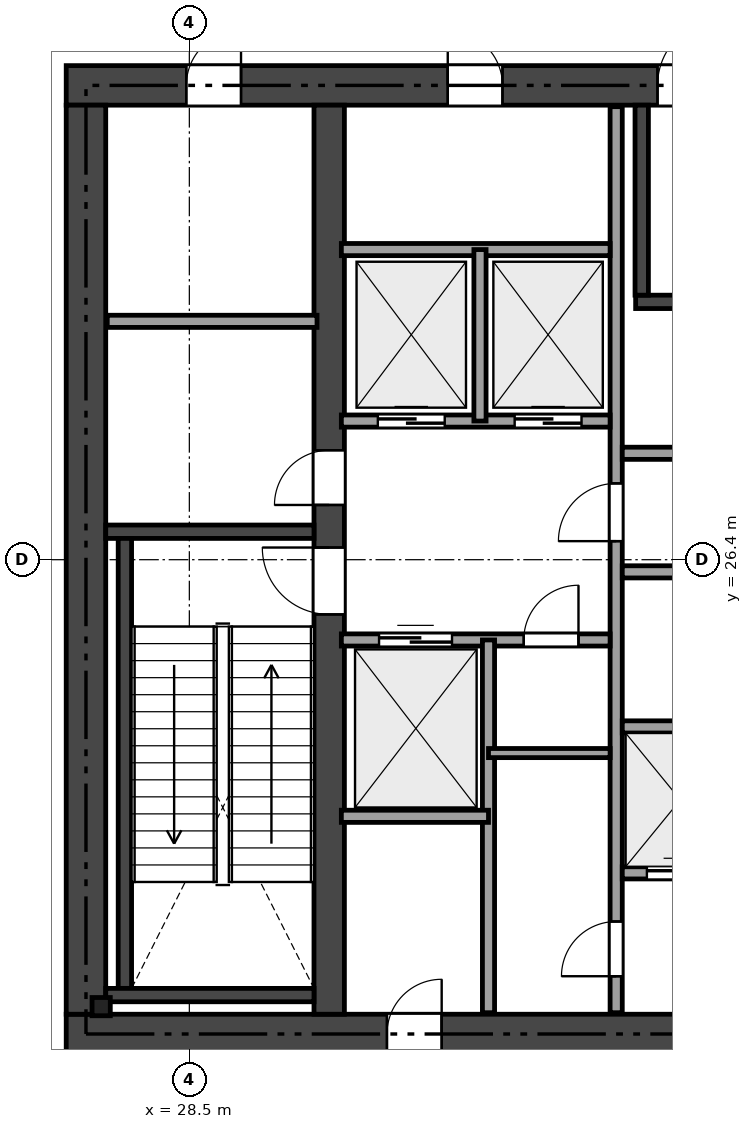
"""IFC4 building model, lengths in metres.
Left out: names, types, materials, properties, quantities, classifications, styles, units other than length and angle.
Written with IfcOpenShell. Run it as: python <this file> out.ifc"""

import sys

from ifc_helpers import new_model, si_unit, direction, frame, frame_2d, origin, origin_2d, place, context, subcontext, project, spatial, rectangle, i_section, extrude, element, fill, save


model = new_model("IFC4")
c1 = context("Model", 3, precision=1e-05, world=origin(), true_north=direction((0.0, 1.0)))
c2 = subcontext(c1, "Body", "Model", "MODEL_VIEW")
j1 = project(units=[si_unit("LENGTHUNIT", "METRE"), si_unit("PLANEANGLEUNIT", "RADIAN")], contexts=[c1])
p1 = place(None, origin())
s1 = spatial("IfcSite", under=j1, at=p1, CompositionType="ELEMENT")
p2 = place(p1, origin())
s2 = spatial("IfcBuilding", under=s1, at=p2, CompositionType="ELEMENT")
p3 = place(p2, frame((0.0, 0.0, 21.6)))
s3 = spatial("IfcBuildingStorey", under=s2, at=p3, CompositionType="ELEMENT", Elevation=21.6)
p4 = place(p3, frame((26.475, 18.6, 0.0), z_axis=(0.0, 0.0, 1.0), x_axis=(1.0, 0.0, 0.0)))
e1 = element("IfcWall", 1, at=p4, inside=s3, PredefinedType="SHEAR", context=c2, shape_type="SweptSolid", body=[
    extrude(rectangle(XDim=21.45, YDim=0.65, at=frame_2d((10.725, 0.0))), origin(), (0.0, 0.0, 1.0), 4.98),
])
p5 = place(p4, frame((12.45, 0.0, 0.0)))
e2 = element("IfcOpeningElement", 2, at=p5, cuts=e1, PredefinedType="OPENING", context=c2, shape_type="SweptSolid", body=[
    extrude(rectangle(XDim=1.15, YDim=2.15, at=frame_2d((0.575, 1.075))), frame((0.0, 0.335, 0.0), z_axis=(0.0, -1.0, 0.0), x_axis=(1.0, 0.0, 0.0)), (0.0, 0.0, 1.0), 0.67),
])
p6 = place(p4, frame((5.275, 0.0, 0.0)))
e3 = element("IfcOpeningElement", 3, at=p6, cuts=e1, PredefinedType="OPENING", context=c2, shape_type="SweptSolid", body=[
    extrude(rectangle(XDim=0.9, YDim=2.1, at=frame_2d((0.45, 1.05))), frame((0.0, 0.335, 0.0), z_axis=(0.0, -1.0, 0.0), x_axis=(1.0, 0.0, 0.0)), (0.0, 0.0, 1.0), 0.67),
])
p7 = place(p3, frame((26.475, 34.2, 0.0), z_axis=(0.0, 0.0, 1.0), x_axis=(1.0, 0.0, 0.0)))
e4 = element("IfcWall", 4, at=p7, inside=s3, PredefinedType="SHEAR", context=c2, shape_type="SweptSolid", body=[
    extrude(rectangle(XDim=21.45, YDim=0.65, at=frame_2d((10.725, 0.0))), origin(), (0.0, 0.0, 1.0), 4.98),
])
p8 = place(p7, frame((9.725, 0.0, 0.0)))
e5 = element("IfcOpeningElement", 5, at=p8, cuts=e4, PredefinedType="OPENING", context=c2, shape_type="SweptSolid", body=[
    extrude(rectangle(XDim=1.1, YDim=2.15, at=frame_2d((0.55, 1.075))), frame((0.0, 0.335, 0.0), z_axis=(0.0, -1.0, 0.0), x_axis=(1.0, 0.0, 0.0)), (0.0, 0.0, 1.0), 0.67),
])
p9 = place(p7, frame((1.975, 0.0, 0.0)))
e6 = element("IfcOpeningElement", 6, at=p9, cuts=e4, PredefinedType="OPENING", context=c2, shape_type="SweptSolid", body=[
    extrude(rectangle(XDim=0.9, YDim=2.1, at=frame_2d((0.45, 1.05))), frame((0.0, 0.335, 0.0), z_axis=(0.0, -1.0, 0.0), x_axis=(1.0, 0.0, 0.0)), (0.0, 0.0, 1.0), 0.67),
])
p10 = place(p7, frame((6.275, 0.0, 0.0)))
e7 = element("IfcOpeningElement", 7, at=p10, cuts=e4, PredefinedType="OPENING", context=c2, shape_type="SweptSolid", body=[
    extrude(rectangle(XDim=0.9, YDim=2.1, at=frame_2d((0.45, 1.05))), frame((0.0, 0.335, 0.0), z_axis=(0.0, -1.0, 0.0), x_axis=(1.0, 0.0, 0.0)), (0.0, 0.0, 1.0), 0.67),
])
p11 = place(p3, frame((26.8, 18.925, 0.0), z_axis=(0.0, 0.0, 1.0), x_axis=(0.0, 1.0, 0.0)))
e8 = element("IfcWall", 8, at=p11, inside=s3, PredefinedType="SHEAR", context=c2, shape_type="SweptSolid", body=[
    extrude(rectangle(XDim=14.95, YDim=0.65, at=frame_2d((7.475, 0.0))), origin(), (0.0, 0.0, 1.0), 4.98),
])
p12 = place(p3, frame((30.8, 18.925, 0.0), z_axis=(0.0, 0.0, 1.0), x_axis=(0.0, 1.0, 0.0)))
e9 = element("IfcWall", 9, at=p12, inside=s3, PredefinedType="SHEAR", context=c2, shape_type="SweptSolid", body=[
    extrude(rectangle(XDim=14.95, YDim=0.5, at=frame_2d((7.475, 0.0))), origin(), (0.0, 0.0, 1.0), 4.98),
])
p13 = place(p12, frame((6.575, 0.0, 0.0)))
e10 = element("IfcOpeningElement", 10, at=p13, cuts=e9, PredefinedType="OPENING", context=c2, shape_type="SweptSolid", body=[
    extrude(rectangle(XDim=1.1, YDim=2.15, at=frame_2d((0.55, 1.075))), frame((0.0, 0.26, 0.0), z_axis=(0.0, -1.0, 0.0), x_axis=(1.0, 0.0, 0.0)), (0.0, 0.0, 1.0), 0.52),
])
p14 = place(p12, frame((8.375, 0.0, 0.0)))
e11 = element("IfcOpeningElement", 11, at=p14, cuts=e9, PredefinedType="OPENING", context=c2, shape_type="SweptSolid", body=[
    extrude(rectangle(XDim=0.9, YDim=2.1, at=frame_2d((0.45, 1.05))), frame((0.0, 0.26, 0.0), z_axis=(0.0, -1.0, 0.0), x_axis=(1.0, 0.0, 0.0)), (0.0, 0.0, 1.0), 0.52),
])
p15 = place(p3, frame((27.125, 26.86, 0.0), z_axis=(0.0, 0.0, 1.0), x_axis=(1.0, 0.0, 0.0)))
e12 = element("IfcWall", 12, at=p15, inside=s3, PredefinedType="SHEAR", context=c2, shape_type="SweptSolid", body=[
    extrude(rectangle(XDim=3.425, YDim=0.22, at=frame_2d((1.712, 0.0))), origin(), (0.0, 0.0, 1.0), 4.98),
])
p16 = place(p3, frame((27.44, 19.35, 0.0), z_axis=(0.0, 0.0, 1.0), x_axis=(0.0, 1.0, 0.0)))
e13 = element("IfcWall", 13, at=p16, inside=s3, PredefinedType="SHEAR", context=c2, shape_type="SweptSolid", body=[
    extrude(rectangle(XDim=7.4, YDim=0.22, at=frame_2d((3.7, 0.0))), origin(), (0.0, 0.0, 1.0), 4.98),
])
p17 = place(p3, frame((27.125, 19.24, 0.0), z_axis=(0.0, 0.0, 1.0), x_axis=(1.0, 0.0, 0.0)))
e14 = element("IfcWall", 14, at=p17, inside=s3, PredefinedType="SHEAR", context=c2, shape_type="SweptSolid", body=[
    extrude(rectangle(XDim=3.425, YDim=0.22, at=frame_2d((1.712, 0.0))), origin(), (0.0, 0.0, 1.0), 4.98),
])
p18 = place(p3, frame((35.84, 30.64, 0.0), z_axis=(0.0, 0.0, 1.0), x_axis=(1.0, 0.0, 0.0)))
e15 = element("IfcWall", 15, at=p18, inside=s3, PredefinedType="SHEAR", context=c2, shape_type="SweptSolid", body=[
    extrude(rectangle(XDim=7.61, YDim=0.22, at=frame_2d((3.805, 0.0))), origin(), (0.0, 0.0, 1.0), 4.98),
])
p19 = place(p3, frame((35.94, 30.75, 0.0), z_axis=(0.0, 0.0, 1.0), x_axis=(0.0, 1.0, 0.0)))
e16 = element("IfcWall", 16, at=p19, inside=s3, PredefinedType="SHEAR", context=c2, shape_type="SweptSolid", body=[
    extrude(rectangle(XDim=3.125, YDim=0.22, at=frame_2d((1.562, 0.0))), origin(), (0.0, 0.0, 1.0), 4.98),
])
p20 = place(p3, frame((27.05, 19.05, 0.0), z_axis=(0.0, 0.0, 1.0), x_axis=(1.0, 0.0, 0.0)))
e17 = element("IfcColumn", 17, at=p20, inside=s3, PredefinedType="PILASTER", context=c2, shape_type="SweptSolid", body=[
    extrude(i_section(OverallWidth=0.3, OverallDepth=0.3, WebThickness=0.011, FlangeThickness=0.019, at=origin_2d()), origin(), (0.0, 0.0, 1.0), 4.98),
])
p21 = place(p3, frame((27.15, 30.32, 0.0), z_axis=(0.0, 0.0, 1.0), x_axis=(1.0, 0.0, 0.0)))
e18 = element("IfcWall", 18, at=p21, inside=s3, PredefinedType="SOLIDWALL", context=c2, shape_type="SweptSolid", body=[
    extrude(rectangle(XDim=3.45, YDim=0.2, at=frame_2d((1.725, 0.0))), origin(), (0.0, 0.0, 1.0), 4.98),
])
p22 = place(p3, frame((35.52, 18.95, 0.0), z_axis=(0.0, 0.0, 1.0), x_axis=(0.0, 1.0, 0.0)))
e19 = element("IfcWall", 19, at=p22, inside=s3, PredefinedType="SOLIDWALL", context=c2, shape_type="SweptSolid", body=[
    extrude(rectangle(XDim=14.9, YDim=0.2, at=frame_2d((7.45, 0.0))), origin(), (0.0, 0.0, 1.0), 4.501),
])
p23 = place(p22, frame((7.755, 0.0, 0.0)))
e20 = element("IfcOpeningElement", 20, at=p23, cuts=e19, PredefinedType="OPENING", context=c2, shape_type="SweptSolid", body=[
    extrude(rectangle(XDim=0.95, YDim=2.15, at=frame_2d((0.475, 1.075))), frame((0.0, 0.11, 0.0), z_axis=(0.0, -1.0, 0.0), x_axis=(1.0, 0.0, 0.0)), (0.0, 0.0, 1.0), 0.22),
])
p24 = place(p22, frame((0.6, 0.0, 0.0)))
e21 = element("IfcOpeningElement", 21, at=p24, cuts=e19, PredefinedType="OPENING", context=c2, shape_type="SweptSolid", body=[
    extrude(rectangle(XDim=0.9, YDim=2.1, at=frame_2d((0.45, 1.05))), frame((0.0, 0.11, 0.0), z_axis=(0.0, -1.0, 0.0), x_axis=(1.0, 0.0, 0.0)), (0.0, 0.0, 1.0), 0.22),
])
p25 = place(p3, frame((31.0, 28.68, 0.0), z_axis=(0.0, 0.0, 1.0), x_axis=(1.0, 0.0, 0.0)))
e22 = element("IfcWall", 22, at=p25, inside=s3, PredefinedType="SOLIDWALL", context=c2, shape_type="SweptSolid", body=[
    extrude(rectangle(XDim=4.42, YDim=0.2, at=frame_2d((2.21, 0.0))), origin(), (0.0, 0.0, 1.0), 4.98),
])
p26 = place(p25, frame((0.6, 0.0, 0.0)))
e23 = element("IfcOpeningElement", 23, at=p26, cuts=e22, PredefinedType="OPENING", context=c2, shape_type="SweptSolid", body=[
    extrude(rectangle(XDim=1.1, YDim=2.15, at=frame_2d((0.55, 1.075))), frame((0.0, 0.11, 0.0), z_axis=(0.0, -1.0, 0.0), x_axis=(1.0, 0.0, 0.0)), (0.0, 0.0, 1.0), 0.22),
])
p27 = place(p25, frame((2.85, 0.0, 0.0)))
e24 = element("IfcOpeningElement", 24, at=p27, cuts=e22, PredefinedType="OPENING", context=c2, shape_type="SweptSolid", body=[
    extrude(rectangle(XDim=1.1, YDim=2.15, at=frame_2d((0.55, 1.075))), frame((0.0, 0.11, 0.0), z_axis=(0.0, -1.0, 0.0), x_axis=(1.0, 0.0, 0.0)), (0.0, 0.0, 1.0), 0.22),
])
p28 = place(p3, frame((31.0, 31.5, 0.0), z_axis=(0.0, 0.0, 1.0), x_axis=(1.0, 0.0, 0.0)))
e25 = element("IfcWall", 25, at=p28, inside=s3, PredefinedType="SOLIDWALL", context=c2, shape_type="SweptSolid", body=[
    extrude(rectangle(XDim=4.42, YDim=0.2, at=frame_2d((2.21, 0.0))), origin(), (0.0, 0.0, 1.0), 4.98),
])
p29 = place(p3, frame((33.28, 28.68, 0.0), z_axis=(0.0, 0.0, 1.0), x_axis=(0.0, 1.0, 0.0)))
e26 = element("IfcWall", 26, at=p29, inside=s3, PredefinedType="SOLIDWALL", context=c2, shape_type="SweptSolid", body=[
    extrude(rectangle(XDim=2.82, YDim=0.2, at=frame_2d((1.41, 0.0))), origin(), (0.0, 0.0, 1.0), 4.98),
])
p30 = place(p3, frame((31.0, 25.08, 0.0), z_axis=(0.0, 0.0, 1.0), x_axis=(1.0, 0.0, 0.0)))
e27 = element("IfcWall", 27, at=p30, inside=s3, PredefinedType="SOLIDWALL", context=c2, shape_type="SweptSolid", body=[
    extrude(rectangle(XDim=4.42, YDim=0.2, at=frame_2d((2.21, 0.0))), origin(), (0.0, 0.0, 1.0), 4.98),
])
p31 = place(p30, frame((3.0, 0.0, 0.0)))
e28 = element("IfcOpeningElement", 28, at=p31, cuts=e27, PredefinedType="OPENING", context=c2, shape_type="SweptSolid", body=[
    extrude(rectangle(XDim=0.9, YDim=2.1, at=frame_2d((0.45, 1.05))), frame((0.0, 0.11, 0.0), z_axis=(0.0, -1.0, 0.0), x_axis=(1.0, 0.0, 0.0)), (0.0, 0.0, 1.0), 0.22),
])
p32 = place(p30, frame((0.62, 0.0, 0.0)))
e29 = element("IfcOpeningElement", 29, at=p32, cuts=e27, PredefinedType="OPENING", context=c2, shape_type="SweptSolid", body=[
    extrude(rectangle(XDim=1.2, YDim=2.15, at=frame_2d((0.6, 1.075))), frame((0.0, 0.11, 0.0), z_axis=(0.0, -1.0, 0.0), x_axis=(1.0, 0.0, 0.0)), (0.0, 0.0, 1.0), 0.22),
])
p33 = place(p3, frame((33.42, 18.95, 0.0), z_axis=(0.0, 0.0, 1.0), x_axis=(0.0, 1.0, 0.0)))
e30 = element("IfcWall", 30, at=p33, inside=s3, PredefinedType="SOLIDWALL", context=c2, shape_type="SweptSolid", body=[
    extrude(rectangle(XDim=6.13, YDim=0.2, at=frame_2d((3.065, 0.0))), origin(), (0.0, 0.0, 1.0), 4.501),
])
p34 = place(p3, frame((31.0, 22.18, 0.0), z_axis=(0.0, 0.0, 1.0), x_axis=(1.0, 0.0, 0.0)))
e31 = element("IfcWall", 31, at=p34, inside=s3, PredefinedType="SOLIDWALL", context=c2, shape_type="SweptSolid", body=[
    extrude(rectangle(XDim=2.42, YDim=0.2, at=frame_2d((1.21, 0.0))), origin(), (0.0, 0.0, 1.0), 4.98),
])
p35 = place(p3, frame((33.42, 23.22, 0.0), z_axis=(0.0, 0.0, 1.0), x_axis=(1.0, 0.0, 0.0)))
e32 = element("IfcWall", 32, at=p35, inside=s3, PredefinedType="PARTITIONING", context=c2, shape_type="SweptSolid", body=[
    extrude(rectangle(XDim=2.0, YDim=0.15, at=frame_2d((1.0, 0.0))), origin(), (0.0, 0.0, 1.0), 4.98),
])
for number, where, z_axis, x_axis in (
    (33, (35.62, 28.15, 0.0), (0.0, 0.0, 1.0), (1.0, 0.0, 0.0)),
    (34, (35.62, 26.2, 0.0), (0.0, 0.0, 1.0), (1.0, 0.0, 0.0)),
):
    element("IfcWall", number, at=place(p3, frame(where, z_axis=z_axis, x_axis=x_axis)), inside=s3, PredefinedType="SOLIDWALL", context=c2, shape_type="SweptSolid", body=[
        extrude(rectangle(XDim=7.88, YDim=0.2, at=frame_2d((3.94, 0.0))), origin(), (0.0, 0.0, 1.0), 4.98),
    ])
p36 = place(p3, frame((35.62, 23.65, 0.0), z_axis=(0.0, 0.0, 1.0), x_axis=(1.0, 0.0, 0.0)))
e35 = element("IfcWall", 35, at=p36, inside=s3, PredefinedType="SOLIDWALL", context=c2, shape_type="SweptSolid", body=[
    extrude(rectangle(XDim=7.88, YDim=0.2, at=frame_2d((3.94, 0.0))), origin(), (0.0, 0.0, 1.0), 4.501),
])
p37 = place(p3, frame((35.62, 21.25, 0.0), z_axis=(0.0, 0.0, 1.0), x_axis=(1.0, 0.0, 0.0)))
e36 = element("IfcWall", 36, at=p37, inside=s3, PredefinedType="SOLIDWALL", context=c2, shape_type="SweptSolid", body=[
    extrude(rectangle(XDim=7.88, YDim=0.2, at=frame_2d((3.94, 0.0))), origin(), (0.0, 0.0, 1.0), 4.98),
])
p38 = place(p37, frame((0.405, 0.0, 0.0)))
e37 = element("IfcOpeningElement", 37, at=p38, cuts=e36, PredefinedType="OPENING", context=c2, shape_type="SweptSolid", body=[
    extrude(rectangle(XDim=1.1, YDim=2.15, at=frame_2d((0.55, 1.075))), frame((0.0, 0.11, 0.0), z_axis=(0.0, -1.0, 0.0), x_axis=(1.0, 0.0, 0.0)), (0.0, 0.0, 1.0), 0.22),
])
p39 = place(p37, frame((2.355, 0.0, 0.0)))
e38 = element("IfcOpeningElement", 38, at=p39, cuts=e36, PredefinedType="OPENING", context=c2, shape_type="SweptSolid", body=[
    extrude(rectangle(XDim=1.1, YDim=2.15, at=frame_2d((0.55, 1.075))), frame((0.0, 0.11, 0.0), z_axis=(0.0, -1.0, 0.0), x_axis=(1.0, 0.0, 0.0)), (0.0, 0.0, 1.0), 0.22),
])
p40 = place(p37, frame((4.305, 0.0, 0.0)))
e39 = element("IfcOpeningElement", 39, at=p40, cuts=e36, PredefinedType="OPENING", context=c2, shape_type="SweptSolid", body=[
    extrude(rectangle(XDim=1.1, YDim=2.15, at=frame_2d((0.55, 1.075))), frame((0.0, 0.11, 0.0), z_axis=(0.0, -1.0, 0.0), x_axis=(1.0, 0.0, 0.0)), (0.0, 0.0, 1.0), 0.22),
])
p41 = place(p37, frame((6.255, 0.0, 0.0)))
e40 = element("IfcOpeningElement", 40, at=p41, cuts=e36, PredefinedType="OPENING", context=c2, shape_type="SweptSolid", body=[
    extrude(rectangle(XDim=1.1, YDim=2.15, at=frame_2d((0.55, 1.075))), frame((0.0, 0.11, 0.0), z_axis=(0.0, -1.0, 0.0), x_axis=(1.0, 0.0, 0.0)), (0.0, 0.0, 1.0), 0.22),
])
p42 = place(p13, origin())
e41 = element("IfcDoor", 41, at=p42, inside=s3, OperationType="SINGLE_SWING_RIGHT", PredefinedType="DOOR", context=c2, shape_type="SweptSolid", body=[
    extrude(rectangle(XDim=1.1, YDim=2.15, at=frame_2d((0.55, 1.075))), frame((0.0, 0.025, 0.0), z_axis=(0.0, -1.0, 0.0), x_axis=(1.0, 0.0, 0.0)), (0.0, 0.0, 1.0), 0.05),
])
fill(e10, e41)
p43 = place(p8, origin())
e42 = element("IfcDoor", 42, at=p43, inside=s3, OperationType="SINGLE_SWING_RIGHT", PredefinedType="DOOR", context=c2, shape_type="SweptSolid", body=[
    extrude(rectangle(XDim=1.1, YDim=2.15, at=frame_2d((0.55, 1.075))), frame((0.0, 0.025, 0.0), z_axis=(0.0, -1.0, 0.0), x_axis=(1.0, 0.0, 0.0)), (0.0, 0.0, 1.0), 0.05),
])
fill(e5, e42)
p44 = place(p23, origin())
e43 = element("IfcDoor", 43, at=p44, inside=s3, OperationType="SINGLE_SWING_LEFT", PredefinedType="DOOR", context=c2, shape_type="SweptSolid", body=[
    extrude(rectangle(XDim=0.95, YDim=2.15, at=frame_2d((0.475, 1.075))), frame((0.0, 0.025, 0.0), z_axis=(0.0, -1.0, 0.0), x_axis=(1.0, 0.0, 0.0)), (0.0, 0.0, 1.0), 0.05),
])
fill(e20, e43)
p45 = place(p14, origin())
e44 = element("IfcDoor", 44, at=p45, inside=s3, OperationType="SINGLE_SWING_LEFT", PredefinedType="DOOR", context=c2, shape_type="SweptSolid", body=[
    extrude(rectangle(XDim=0.9, YDim=2.1, at=frame_2d((0.45, 1.05))), frame((0.0, 0.025, 0.0), z_axis=(0.0, -1.0, 0.0), x_axis=(1.0, 0.0, 0.0)), (0.0, 0.0, 1.0), 0.05),
])
fill(e11, e44)
p46 = place(p9, origin())
e45 = element("IfcDoor", 45, at=p46, inside=s3, OperationType="SINGLE_SWING_RIGHT", PredefinedType="DOOR", context=c2, shape_type="SweptSolid", body=[
    extrude(rectangle(XDim=0.9, YDim=2.1, at=frame_2d((0.45, 1.05))), frame((0.0, 0.025, 0.0), z_axis=(0.0, -1.0, 0.0), x_axis=(1.0, 0.0, 0.0)), (0.0, 0.0, 1.0), 0.05),
])
fill(e6, e45)
p47 = place(p10, origin())
e46 = element("IfcDoor", 46, at=p47, inside=s3, OperationType="SINGLE_SWING_LEFT", PredefinedType="DOOR", context=c2, shape_type="SweptSolid", body=[
    extrude(rectangle(XDim=0.9, YDim=2.1, at=frame_2d((0.45, 1.05))), frame((0.0, 0.025, 0.0), z_axis=(0.0, -1.0, 0.0), x_axis=(1.0, 0.0, 0.0)), (0.0, 0.0, 1.0), 0.05),
])
fill(e7, e46)
p48 = place(p6, origin())
e47 = element("IfcDoor", 47, at=p48, inside=s3, OperationType="SINGLE_SWING_RIGHT", PredefinedType="DOOR", context=c2, shape_type="SweptSolid", body=[
    extrude(rectangle(XDim=0.9, YDim=2.1, at=frame_2d((0.45, 1.05))), frame((0.0, 0.025, 0.0), z_axis=(0.0, -1.0, 0.0), x_axis=(1.0, 0.0, 0.0)), (0.0, 0.0, 1.0), 0.05),
])
fill(e3, e47)
p49 = place(p24, origin())
e48 = element("IfcDoor", 48, at=p49, inside=s3, OperationType="SINGLE_SWING_LEFT", PredefinedType="DOOR", context=c2, shape_type="SweptSolid", body=[
    extrude(rectangle(XDim=0.9, YDim=2.1, at=frame_2d((0.45, 1.05))), frame((0.0, 0.025, 0.0), z_axis=(0.0, -1.0, 0.0), x_axis=(1.0, 0.0, 0.0)), (0.0, 0.0, 1.0), 0.05),
])
fill(e21, e48)
p50 = place(p31, origin())
e49 = element("IfcDoor", 49, at=p50, inside=s3, OperationType="SINGLE_SWING_RIGHT", PredefinedType="DOOR", context=c2, shape_type="SweptSolid", body=[
    extrude(rectangle(XDim=0.9, YDim=2.1, at=frame_2d((0.45, 1.05))), frame((0.0, 0.025, 0.0), z_axis=(0.0, -1.0, 0.0), x_axis=(1.0, 0.0, 0.0)), (0.0, 0.0, 1.0), 0.05),
])
fill(e28, e49)
p51 = place(p26, origin())
e50 = element("IfcDoor", 50, at=p51, inside=s3, OperationType="SLIDING_TO_LEFT", PredefinedType="DOOR", context=c2, shape_type="SweptSolid", body=[
    extrude(rectangle(XDim=1.1, YDim=2.15, at=frame_2d((0.55, 1.075))), frame((0.0, 0.025, 0.0), z_axis=(0.0, -1.0, 0.0), x_axis=(1.0, 0.0, 0.0)), (0.0, 0.0, 1.0), 0.05),
])
fill(e23, e50)
p52 = place(p27, origin())
e51 = element("IfcDoor", 51, at=p52, inside=s3, OperationType="SLIDING_TO_LEFT", PredefinedType="DOOR", context=c2, shape_type="SweptSolid", body=[
    extrude(rectangle(XDim=1.1, YDim=2.15, at=frame_2d((0.55, 1.075))), frame((0.0, 0.025, 0.0), z_axis=(0.0, -1.0, 0.0), x_axis=(1.0, 0.0, 0.0)), (0.0, 0.0, 1.0), 0.05),
])
fill(e24, e51)
p53 = place(p32, origin())
e52 = element("IfcDoor", 52, at=p53, inside=s3, OperationType="SLIDING_TO_LEFT", PredefinedType="DOOR", context=c2, shape_type="SweptSolid", body=[
    extrude(rectangle(XDim=1.2, YDim=2.15, at=frame_2d((0.6, 1.075))), frame((0.0, 0.025, 0.0), z_axis=(0.0, -1.0, 0.0), x_axis=(1.0, 0.0, 0.0)), (0.0, 0.0, 1.0), 0.05),
])
fill(e29, e52)
p54 = place(p38, origin())
e53 = element("IfcDoor", 53, at=p54, inside=s3, OperationType="SLIDING_TO_LEFT", PredefinedType="DOOR", context=c2, shape_type="SweptSolid", body=[
    extrude(rectangle(XDim=1.1, YDim=2.15, at=frame_2d((0.55, 1.075))), frame((0.0, 0.025, 0.0), z_axis=(0.0, -1.0, 0.0), x_axis=(1.0, 0.0, 0.0)), (0.0, 0.0, 1.0), 0.05),
])
fill(e37, e53)
save(model, sys.argv[1])
